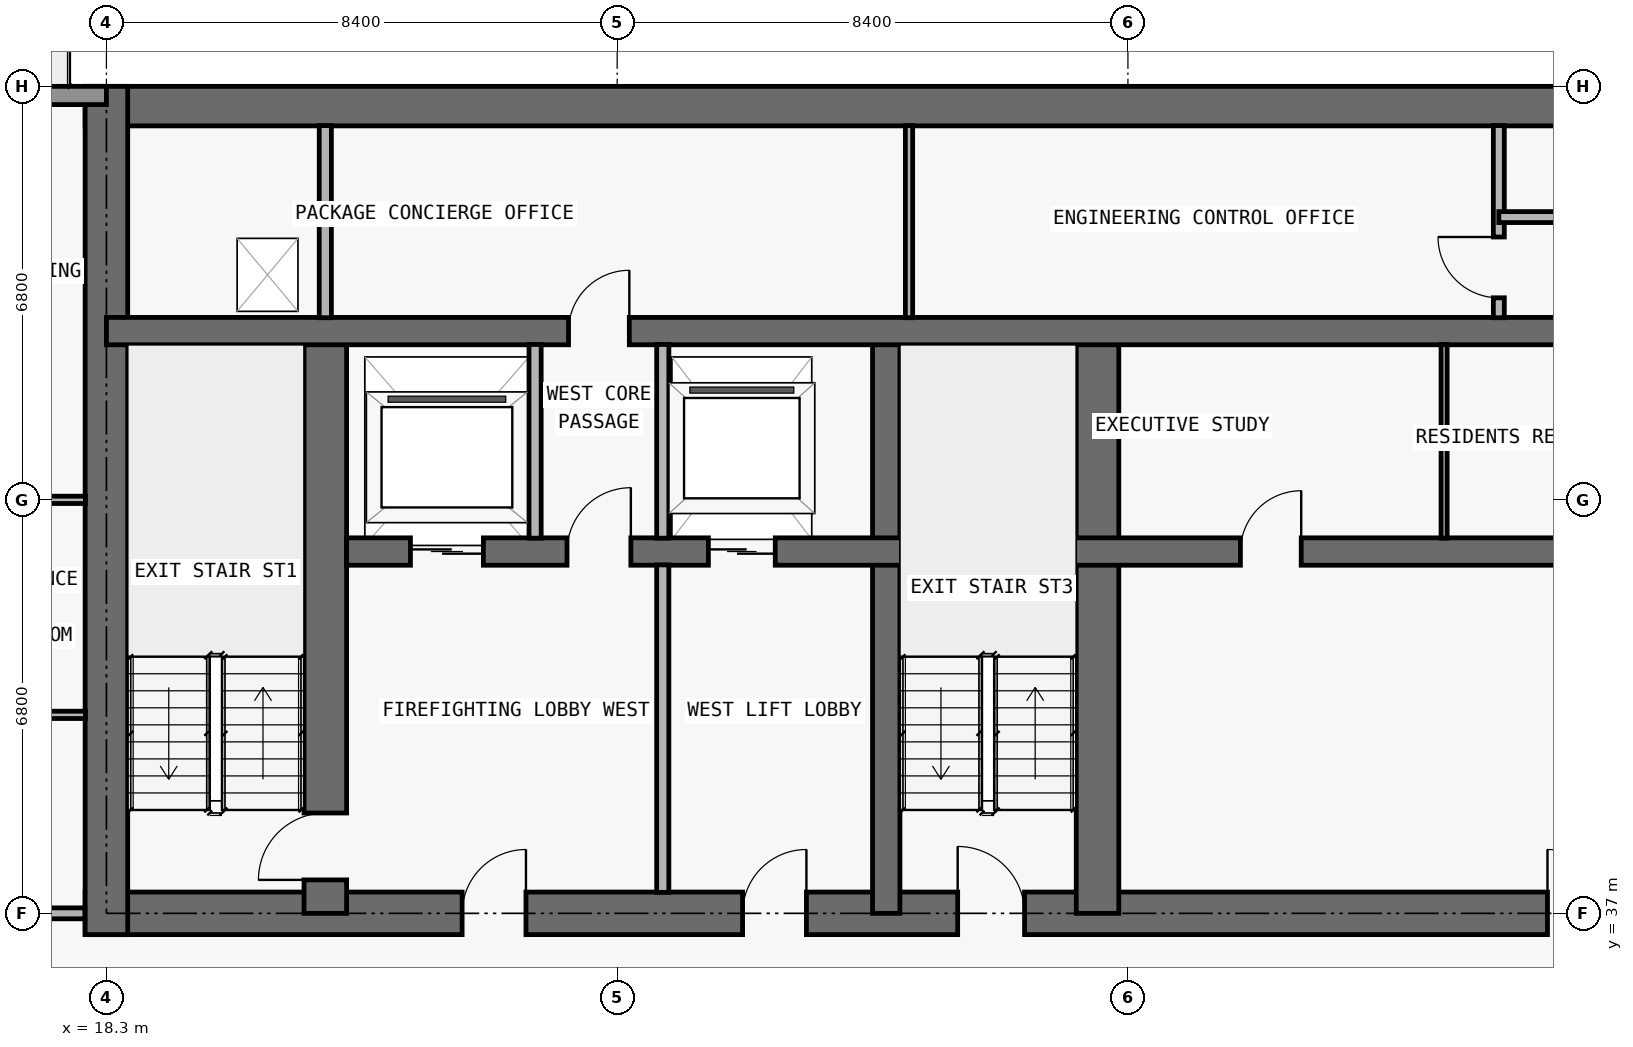
"""IFC4 building model, lengths in metres.
Left out: names, types, materials, properties, quantities, classifications, styles, units other than length and angle.
Written with IfcOpenShell. Run it as: python <this file> out.ifc"""

import sys

from ifc_helpers import new_model, si_unit, direction, frame, frame_2d, origin, place, context, subcontext, project, spatial, rectangle, extrude, element, fill, save


model = new_model("IFC4")
c1 = context("Model", 3, precision=1e-05, world=origin(), true_north=direction((0.0, 1.0)))
c2 = subcontext(c1, "Body", "Model", "MODEL_VIEW")
j1 = project(units=[si_unit("LENGTHUNIT", "METRE"), si_unit("PLANEANGLEUNIT", "RADIAN")], contexts=[c1])
p1 = place(None, origin())
s1 = spatial("IfcSite", under=j1, at=p1, CompositionType="ELEMENT")
p2 = place(p1, origin())
s2 = spatial("IfcBuilding", under=s1, at=p2, CompositionType="ELEMENT")
p3 = place(p2, frame((0.0, 0.0, 262.8)))
s3 = spatial("IfcBuildingStorey", under=s2, at=p3, CompositionType="ELEMENT", Elevation=262.8)
p4 = place(p3, frame((17.95, 37.0, 0.0), z_axis=(0.0, 0.0, 1.0), x_axis=(1.0, 0.0, 0.0)))
e1 = element("IfcWall", 1, at=p4, inside=s3, PredefinedType="SHEAR", context=c2, shape_type="SweptSolid", body=[
    extrude(rectangle(XDim=41.9, YDim=0.7, at=frame_2d((20.95, 0.0))), origin(), (0.0, 0.0, 1.0), 3.05),
])
p5 = place(p4, frame((14.35, 0.0, 0.0)))
e2 = element("IfcOpeningElement", 2, at=p5, cuts=e1, PredefinedType="OPENING", context=c2, shape_type="SweptSolid", body=[
    extrude(rectangle(XDim=1.1, YDim=2.15, at=frame_2d((0.55, 1.075))), frame((0.0, 0.36, 0.0), z_axis=(0.0, -1.0, 0.0), x_axis=(1.0, 0.0, 0.0)), (0.0, 0.0, 1.0), 0.72),
])
p6 = place(p4, frame((6.2, 0.0, 0.0)))
e3 = element("IfcOpeningElement", 3, at=p6, cuts=e1, PredefinedType="OPENING", context=c2, shape_type="SweptSolid", body=[
    extrude(rectangle(XDim=1.05, YDim=2.15, at=frame_2d((0.525, 1.075))), frame((0.0, 0.36, 0.0), z_axis=(0.0, -1.0, 0.0), x_axis=(1.0, 0.0, 0.0)), (0.0, 0.0, 1.0), 0.72),
])
p7 = place(p4, frame((34.7, 0.0, 0.0)))
e4 = element("IfcOpeningElement", 4, at=p7, cuts=e1, PredefinedType="OPENING", context=c2, shape_type="SweptSolid", body=[
    extrude(rectangle(XDim=1.05, YDim=2.15, at=frame_2d((0.525, 1.075))), frame((0.0, 0.36, 0.0), z_axis=(0.0, -1.0, 0.0), x_axis=(1.0, 0.0, 0.0)), (0.0, 0.0, 1.0), 0.72),
])
p8 = place(p4, frame((10.812, 0.0, 0.0)))
e5 = element("IfcOpeningElement", 5, at=p8, cuts=e1, PredefinedType="OPENING", context=c2, shape_type="SweptSolid", body=[
    extrude(rectangle(XDim=1.05, YDim=2.15, at=frame_2d((0.525, 1.075))), frame((0.0, 0.36, 0.0), z_axis=(0.0, -1.0, 0.0), x_axis=(1.0, 0.0, 0.0)), (0.0, 0.0, 1.0), 0.72),
])
p9 = place(p4, frame((24.05, 0.0, 0.0)))
e6 = element("IfcOpeningElement", 6, at=p9, cuts=e1, PredefinedType="OPENING", context=c2, shape_type="SweptSolid", body=[
    extrude(rectangle(XDim=1.05, YDim=2.15, at=frame_2d((0.525, 1.075))), frame((0.0, 0.36, 0.0), z_axis=(0.0, -1.0, 0.0), x_axis=(1.0, 0.0, 0.0)), (0.0, 0.0, 1.0), 0.72),
])
p10 = place(p3, frame((17.95, 50.275, 0.0), z_axis=(0.0, 0.0, 1.0), x_axis=(1.0, 0.0, 0.0)))
e7 = element("IfcWall", 7, at=p10, inside=s3, PredefinedType="SHEAR", context=c2, shape_type="SweptSolid", body=[
    extrude(rectangle(XDim=41.9, YDim=0.65, at=frame_2d((20.95, 0.0))), origin(), (0.0, 0.0, 1.0), 3.05),
])
p11 = place(p3, frame((18.3, 36.65, 0.0), z_axis=(0.0, 0.0, 1.0), x_axis=(0.0, 1.0, 0.0)))
e8 = element("IfcWall", 8, at=p11, inside=s3, PredefinedType="SHEAR", context=c2, shape_type="SweptSolid", body=[
    extrude(rectangle(XDim=13.95, YDim=0.7, at=frame_2d((6.975, 0.0))), origin(), (0.0, 0.0, 1.0), 3.05),
])
p12 = place(p3, frame((21.9, 37.0, 0.0), z_axis=(0.0, 0.0, 1.0), x_axis=(0.0, 1.0, 0.0)))
e9 = element("IfcWall", 9, at=p12, inside=s3, PredefinedType="SHEAR", context=c2, shape_type="SweptSolid", body=[
    extrude(rectangle(XDim=9.575, YDim=0.7, at=frame_2d((4.788, 0.0))), origin(), (0.0, 0.0, 1.0), 3.05),
])
p13 = place(p12, frame((0.55, 0.0, 0.0)))
e10 = element("IfcOpeningElement", 10, at=p13, cuts=e9, PredefinedType="OPENING", context=c2, shape_type="SweptSolid", body=[
    extrude(rectangle(XDim=1.1, YDim=2.15, at=frame_2d((0.55, 1.075))), frame((0.0, 0.36, 0.0), z_axis=(0.0, -1.0, 0.0), x_axis=(1.0, 0.0, 0.0)), (0.0, 0.0, 1.0), 0.72),
])
p14 = place(p3, frame((31.125, 37.0, 0.0), z_axis=(0.0, 0.0, 1.0), x_axis=(0.0, 1.0, 0.0)))
e11 = element("IfcWall", 11, at=p14, inside=s3, PredefinedType="SHEAR", context=c2, shape_type="SweptSolid", body=[
    extrude(rectangle(XDim=9.575, YDim=0.45, at=frame_2d((4.788, 0.0))), origin(), (0.0, 0.0, 1.0), 3.05),
])
p15 = place(p3, frame((34.6, 37.0, 0.0), z_axis=(0.0, 0.0, 1.0), x_axis=(0.0, 1.0, 0.0)))
e12 = element("IfcWall", 12, at=p15, inside=s3, PredefinedType="SHEAR", context=c2, shape_type="SweptSolid", body=[
    extrude(rectangle(XDim=9.575, YDim=0.7, at=frame_2d((4.788, 0.0))), origin(), (0.0, 0.0, 1.0), 3.05),
])
p16 = place(p3, frame((22.25, 42.95, 0.0), z_axis=(0.0, 0.0, 1.0), x_axis=(1.0, 0.0, 0.0)))
e13 = element("IfcWall", 13, at=p16, inside=s3, PredefinedType="SHEAR", context=c2, shape_type="SweptSolid", body=[
    extrude(rectangle(XDim=33.3, YDim=0.45, at=frame_2d((16.65, 0.0))), origin(), (0.0, 0.0, 1.0), 3.05),
])
p17 = place(p16, frame((1.05, 0.0, 0.0)))
e14 = element("IfcOpeningElement", 14, at=p17, cuts=e13, PredefinedType="OPENING", context=c2, shape_type="SweptSolid", body=[
    extrude(rectangle(XDim=1.2, YDim=2.2, at=frame_2d((0.6, 1.1))), frame((0.0, 0.235, 0.0), z_axis=(0.0, -1.0, 0.0), x_axis=(1.0, 0.0, 0.0)), (0.0, 0.0, 1.0), 0.47),
])
p18 = place(p16, frame((31.05, 0.0, 0.0)))
e15 = element("IfcOpeningElement", 15, at=p18, cuts=e13, PredefinedType="OPENING", context=c2, shape_type="SweptSolid", body=[
    extrude(rectangle(XDim=1.2, YDim=2.2, at=frame_2d((0.6, 1.1))), frame((0.0, 0.235, 0.0), z_axis=(0.0, -1.0, 0.0), x_axis=(1.0, 0.0, 0.0)), (0.0, 0.0, 1.0), 0.47),
])
p19 = place(p16, frame((26.45, 0.0, 0.0)))
e16 = element("IfcOpeningElement", 16, at=p19, cuts=e13, PredefinedType="OPENING", context=c2, shape_type="SweptSolid", body=[
    extrude(rectangle(XDim=1.1, YDim=2.2, at=frame_2d((0.55, 1.1))), frame((0.0, 0.235, 0.0), z_axis=(0.0, -1.0, 0.0), x_axis=(1.0, 0.0, 0.0)), (0.0, 0.0, 1.0), 0.47),
])
p20 = place(p16, frame((5.95, 0.0, 0.0)))
e17 = element("IfcOpeningElement", 17, at=p20, cuts=e13, PredefinedType="OPENING", context=c2, shape_type="SweptSolid", body=[
    extrude(rectangle(XDim=1.1, YDim=2.2, at=frame_2d((0.55, 1.1))), frame((0.0, 0.235, 0.0), z_axis=(0.0, -1.0, 0.0), x_axis=(1.0, 0.0, 0.0)), (0.0, 0.0, 1.0), 0.47),
])
p21 = place(p16, frame((3.625, 0.0, 0.0)))
e18 = element("IfcOpeningElement", 18, at=p21, cuts=e13, PredefinedType="OPENING", context=c2, shape_type="SweptSolid", body=[
    extrude(rectangle(XDim=1.05, YDim=2.15, at=frame_2d((0.525, 1.075))), frame((0.0, 0.235, 0.0), z_axis=(0.0, -1.0, 0.0), x_axis=(1.0, 0.0, 0.0)), (0.0, 0.0, 1.0), 0.47),
])
p22 = place(p16, frame((28.675, 0.0, 0.0)))
e19 = element("IfcOpeningElement", 19, at=p22, cuts=e13, PredefinedType="OPENING", context=c2, shape_type="SweptSolid", body=[
    extrude(rectangle(XDim=1.05, YDim=2.15, at=frame_2d((0.525, 1.075))), frame((0.0, 0.235, 0.0), z_axis=(0.0, -1.0, 0.0), x_axis=(1.0, 0.0, 0.0)), (0.0, 0.0, 1.0), 0.47),
])
p23 = place(p16, frame((14.7, 0.0, 0.0)))
e20 = element("IfcOpeningElement", 20, at=p23, cuts=e13, PredefinedType="OPENING", context=c2, shape_type="SweptSolid", body=[
    extrude(rectangle(XDim=1.0, YDim=2.2, at=frame_2d((0.5, 1.1))), frame((0.0, 0.235, 0.0), z_axis=(0.0, -1.0, 0.0), x_axis=(1.0, 0.0, 0.0)), (0.0, 0.0, 1.0), 0.47),
])
p24 = place(p16, frame((21.45, 0.0, 0.0)))
e21 = element("IfcOpeningElement", 21, at=p24, cuts=e13, PredefinedType="OPENING", context=c2, shape_type="SweptSolid", body=[
    extrude(rectangle(XDim=1.0, YDim=2.2, at=frame_2d((0.5, 1.1))), frame((0.0, 0.235, 0.0), z_axis=(0.0, -1.0, 0.0), x_axis=(1.0, 0.0, 0.0)), (0.0, 0.0, 1.0), 0.47),
])
p25 = place(p3, frame((18.3, 46.575, 0.0), z_axis=(0.0, 0.0, 1.0), x_axis=(1.0, 0.0, 0.0)))
e22 = element("IfcWall", 22, at=p25, inside=s3, PredefinedType="SHEAR", context=c2, shape_type="SweptSolid", body=[
    extrude(rectangle(XDim=41.2, YDim=0.45, at=frame_2d((20.6, 0.0))), origin(), (0.0, 0.0, 1.0), 3.05),
])
p26 = place(p25, frame((7.6, 0.0, 0.0)))
e23 = element("IfcOpeningElement", 23, at=p26, cuts=e22, PredefinedType="OPENING", context=c2, shape_type="SweptSolid", body=[
    extrude(rectangle(XDim=1.0, YDim=2.2, at=frame_2d((0.5, 1.1))), frame((0.0, 0.235, 0.0), z_axis=(0.0, -1.0, 0.0), x_axis=(1.0, 0.0, 0.0)), (0.0, 0.0, 1.0), 0.47),
])
p27 = place(p25, frame((32.625, 0.0, 0.0)))
e24 = element("IfcOpeningElement", 24, at=p27, cuts=e22, PredefinedType="OPENING", context=c2, shape_type="SweptSolid", body=[
    extrude(rectangle(XDim=1.05, YDim=2.15, at=frame_2d((0.525, 1.075))), frame((0.0, 0.235, 0.0), z_axis=(0.0, -1.0, 0.0), x_axis=(1.0, 0.0, 0.0)), (0.0, 0.0, 1.0), 0.47),
])
p28 = place(p3, frame((12.1, 50.45, 0.0), z_axis=(0.0, 0.0, 1.0), x_axis=(1.0, 0.0, 0.0)))
e25 = element("IfcWall", 25, at=p28, inside=s3, PredefinedType="STANDARD", context=c2, shape_type="SweptSolid", body=[
    extrude(rectangle(XDim=6.2, YDim=0.3, at=frame_2d((3.1, 0.0))), origin(), (0.0, 0.0, 1.0), 3.05),
])
p29 = place(p28, frame((2.1, 0.0, 0.0)))
e26 = element("IfcOpeningElement", 26, at=p29, cuts=e25, PredefinedType="OPENING", context=c2, shape_type="SweptSolid", body=[
    extrude(rectangle(XDim=2.0, YDim=2.3, at=frame_2d((1.0, 1.15))), frame((0.0, 0.16, 0.0), z_axis=(0.0, -1.0, 0.0), x_axis=(1.0, 0.0, 0.0)), (0.0, 0.0, 1.0), 0.32),
])
p30 = place(p3, frame((21.9, 46.795, 0.0), z_axis=(0.0, 0.0, 1.0), x_axis=(0.0, 1.0, 0.0)))
e27 = element("IfcWall", 27, at=p30, inside=s3, PredefinedType="PARTITIONING", context=c2, shape_type="SweptSolid", body=[
    extrude(rectangle(XDim=3.16, YDim=0.2, at=frame_2d((1.58, 0.0))), origin(), (0.0, 0.0, 1.0), 3.05),
])
p31 = place(p3, frame((25.35, 43.17, 0.0), z_axis=(0.0, 0.0, 1.0), x_axis=(0.0, 1.0, 0.0)))
e28 = element("IfcWall", 28, at=p31, inside=s3, PredefinedType="PARTITIONING", context=c2, shape_type="SweptSolid", body=[
    extrude(rectangle(XDim=3.185, YDim=0.2, at=frame_2d((1.593, 0.0))), origin(), (0.0, 0.0, 1.0), 3.05),
])
p32 = place(p3, frame((27.45, 37.345, 0.0), z_axis=(0.0, 0.0, 1.0), x_axis=(0.0, 1.0, 0.0)))
e29 = element("IfcWall", 29, at=p32, inside=s3, PredefinedType="PARTITIONING", context=c2, shape_type="SweptSolid", body=[
    extrude(rectangle(XDim=5.385, YDim=0.2, at=frame_2d((2.692, 0.0))), origin(), (0.0, 0.0, 1.0), 3.05),
])
p33 = place(p3, frame((27.45, 43.17, 0.0), z_axis=(0.0, 0.0, 1.0), x_axis=(0.0, 1.0, 0.0)))
e30 = element("IfcWall", 30, at=p33, inside=s3, PredefinedType="PARTITIONING", context=c2, shape_type="SweptSolid", body=[
    extrude(rectangle(XDim=3.185, YDim=0.2, at=frame_2d((1.593, 0.0))), origin(), (0.0, 0.0, 1.0), 3.05),
])
p34 = place(p3, frame((31.5, 46.795, 0.0), z_axis=(0.0, 0.0, 1.0), x_axis=(0.0, 1.0, 0.0)))
e31 = element("IfcWall", 31, at=p34, inside=s3, PredefinedType="PARTITIONING", context=c2, shape_type="SweptSolid", body=[
    extrude(rectangle(XDim=3.16, YDim=0.12, at=frame_2d((1.58, 0.0))), origin(), (0.0, 0.0, 1.0), 3.05),
])
p35 = place(p3, frame((40.3, 43.17, 0.0), z_axis=(0.0, 0.0, 1.0), x_axis=(0.0, 1.0, 0.0)))
e32 = element("IfcWall", 32, at=p35, inside=s3, PredefinedType="MOVABLE", context=c2, shape_type="SweptSolid", body=[
    extrude(rectangle(XDim=3.185, YDim=0.1, at=frame_2d((1.593, 0.0))), origin(), (0.0, 0.0, 1.0), 3.05),
])
p36 = place(p3, frame((41.2, 46.795, 0.0), z_axis=(0.0, 0.0, 1.0), x_axis=(0.0, 1.0, 0.0)))
e33 = element("IfcWall", 33, at=p36, inside=s3, PredefinedType="PARTITIONING", context=c2, shape_type="SweptSolid", body=[
    extrude(rectangle(XDim=3.16, YDim=0.18, at=frame_2d((1.58, 0.0))), origin(), (0.0, 0.0, 1.0), 3.05),
])
p37 = place(p36, frame((0.327, 0.0, 0.0)))
e34 = element("IfcOpeningElement", 34, at=p37, cuts=e33, PredefinedType="OPENING", context=c2, shape_type="SweptSolid", body=[
    extrude(rectangle(XDim=1.0, YDim=2.2, at=frame_2d((0.5, 1.1))), frame((0.0, 0.1, 0.0), z_axis=(0.0, -1.0, 0.0), x_axis=(1.0, 0.0, 0.0)), (0.0, 0.0, 1.0), 0.2),
])
p38 = place(p3, frame((15.203, 37.0, 0.0), z_axis=(0.0, 0.0, 1.0), x_axis=(1.0, 0.0, 0.0)))
e35 = element("IfcWall", 35, at=p38, inside=s3, PredefinedType="PARTITIONING", context=c2, shape_type="SweptSolid", body=[
    extrude(rectangle(XDim=2.742, YDim=0.18, at=frame_2d((1.371, 0.0))), origin(), (0.0, 0.0, 1.0), 3.05),
])
p39 = place(p3, frame((15.65, 40.264, 0.0), z_axis=(0.0, 0.0, 1.0), x_axis=(1.0, 0.0, 0.0)))
e36 = element("IfcWall", 36, at=p39, inside=s3, PredefinedType="PARTITIONING", context=c2, shape_type="SweptSolid", body=[
    extrude(rectangle(XDim=2.305, YDim=0.12, at=frame_2d((1.153, 0.0))), origin(), (0.0, 0.0, 1.0), 3.05),
])
p40 = place(p3, frame((15.203, 43.8, 0.0), z_axis=(0.0, 0.0, 1.0), x_axis=(1.0, 0.0, 0.0)))
e37 = element("IfcWall", 37, at=p40, inside=s3, PredefinedType="PARTITIONING", context=c2, shape_type="SweptSolid", body=[
    extrude(rectangle(XDim=2.752, YDim=0.12, at=frame_2d((1.376, 0.0))), origin(), (0.0, 0.0, 1.0), 2.418),
])
p41 = place(p40, frame((1.175, 0.0, 0.0)))
e38 = element("IfcOpeningElement", 38, at=p41, cuts=e37, PredefinedType="OPENING", context=c2, shape_type="SweptSolid", body=[
    extrude(rectangle(XDim=0.85, YDim=2.1, at=frame_2d((0.425, 1.05))), frame((0.0, 0.07, 0.0), z_axis=(0.0, -1.0, 0.0), x_axis=(1.0, 0.0, 0.0)), (0.0, 0.0, 1.0), 0.14),
])
p42 = place(p3, frame((41.2, 48.45, 0.0), z_axis=(0.0, 0.0, 1.0), x_axis=(1.0, 0.0, 0.0)))
e39 = element("IfcWall", 39, at=p42, inside=s3, PredefinedType="PARTITIONING", context=c2, shape_type="SweptSolid", body=[
    extrude(rectangle(XDim=14.7, YDim=0.18, at=frame_2d((7.35, 0.0))), origin(), (0.0, 0.0, 1.0), 3.05),
])
p43 = place(p42, frame((1.85, 0.0, 0.0)))
e40 = element("IfcOpeningElement", 40, at=p43, cuts=e39, PredefinedType="OPENING", context=c2, shape_type="SweptSolid", body=[
    extrude(rectangle(XDim=1.2, YDim=2.2, at=frame_2d((0.6, 1.1))), frame((0.0, 0.1, 0.0), z_axis=(0.0, -1.0, 0.0), x_axis=(1.0, 0.0, 0.0)), (0.0, 0.0, 1.0), 0.2),
])
p44 = place(p42, frame((6.75, 0.0, 0.0)))
e41 = element("IfcOpeningElement", 41, at=p44, cuts=e39, PredefinedType="OPENING", context=c2, shape_type="SweptSolid", body=[
    extrude(rectangle(XDim=1.2, YDim=2.2, at=frame_2d((0.6, 1.1))), frame((0.0, 0.1, 0.0), z_axis=(0.0, -1.0, 0.0), x_axis=(1.0, 0.0, 0.0)), (0.0, 0.0, 1.0), 0.2),
])
p45 = place(p42, frame((11.825, 0.0, 0.0)))
e42 = element("IfcOpeningElement", 42, at=p45, cuts=e39, PredefinedType="OPENING", context=c2, shape_type="SweptSolid", body=[
    extrude(rectangle(XDim=0.85, YDim=2.1, at=frame_2d((0.425, 1.05))), frame((0.0, 0.1, 0.0), z_axis=(0.0, -1.0, 0.0), x_axis=(1.0, 0.0, 0.0)), (0.0, 0.0, 1.0), 0.2),
])
p46 = place(p17, origin())
e43 = element("IfcDoor", 43, at=p46, inside=s3, OperationType="DOUBLE_DOOR_SLIDING", PredefinedType="DOOR", context=c2, shape_type="SweptSolid", body=[
    extrude(rectangle(XDim=1.2, YDim=2.2, at=frame_2d((0.6, 1.1))), frame((0.0, 0.025, 0.0), z_axis=(0.0, -1.0, 0.0), x_axis=(1.0, 0.0, 0.0)), (0.0, 0.0, 1.0), 0.05),
])
fill(e14, e43)
p47 = place(p20, origin())
e44 = element("IfcDoor", 44, at=p47, inside=s3, OperationType="DOUBLE_DOOR_SLIDING", PredefinedType="DOOR", context=c2, shape_type="SweptSolid", body=[
    extrude(rectangle(XDim=1.1, YDim=2.2, at=frame_2d((0.55, 1.1))), frame((0.0, 0.025, 0.0), z_axis=(0.0, -1.0, 0.0), x_axis=(1.0, 0.0, 0.0)), (0.0, 0.0, 1.0), 0.05),
])
fill(e17, e44)
p48 = place(p5, origin())
e45 = element("IfcDoor", 45, at=p48, inside=s3, OperationType="SINGLE_SWING_LEFT", PredefinedType="DOOR", context=c2, shape_type="SweptSolid", body=[
    extrude(rectangle(XDim=1.1, YDim=2.15, at=frame_2d((0.55, 1.075))), frame((0.0, 0.025, 0.0), z_axis=(0.0, -1.0, 0.0), x_axis=(1.0, 0.0, 0.0)), (0.0, 0.0, 1.0), 0.05),
])
fill(e2, e45)
p49 = place(p6, origin())
e46 = element("IfcDoor", 46, at=p49, inside=s3, OperationType="SINGLE_SWING_RIGHT", PredefinedType="DOOR", context=c2, shape_type="SweptSolid", body=[
    extrude(rectangle(XDim=1.05, YDim=2.15, at=frame_2d((0.525, 1.075))), frame((0.0, 0.025, 0.0), z_axis=(0.0, -1.0, 0.0), x_axis=(1.0, 0.0, 0.0)), (0.0, 0.0, 1.0), 0.05),
])
fill(e3, e46)
p50 = place(p13, origin())
e47 = element("IfcDoor", 47, at=p50, inside=s3, OperationType="SINGLE_SWING_LEFT", PredefinedType="DOOR", context=c2, shape_type="SweptSolid", body=[
    extrude(rectangle(XDim=1.1, YDim=2.15, at=frame_2d((0.55, 1.075))), frame((0.0, 0.025, 0.0), z_axis=(0.0, -1.0, 0.0), x_axis=(1.0, 0.0, 0.0)), (0.0, 0.0, 1.0), 0.05),
])
fill(e10, e47)
p51 = place(p21, origin())
e48 = element("IfcDoor", 48, at=p51, inside=s3, OperationType="SINGLE_SWING_RIGHT", PredefinedType="DOOR", context=c2, shape_type="SweptSolid", body=[
    extrude(rectangle(XDim=1.05, YDim=2.15, at=frame_2d((0.525, 1.075))), frame((0.0, 0.025, 0.0), z_axis=(0.0, -1.0, 0.0), x_axis=(1.0, 0.0, 0.0)), (0.0, 0.0, 1.0), 0.05),
])
fill(e18, e48)
p52 = place(p8, origin())
e49 = element("IfcDoor", 49, at=p52, inside=s3, OperationType="SINGLE_SWING_RIGHT", PredefinedType="DOOR", context=c2, shape_type="SweptSolid", body=[
    extrude(rectangle(XDim=1.05, YDim=2.15, at=frame_2d((0.525, 1.075))), frame((0.0, 0.025, 0.0), z_axis=(0.0, -1.0, 0.0), x_axis=(1.0, 0.0, 0.0)), (0.0, 0.0, 1.0), 0.05),
])
fill(e5, e49)
p53 = place(p9, origin())
e50 = element("IfcDoor", 50, at=p53, inside=s3, OperationType="SINGLE_SWING_LEFT", PredefinedType="DOOR", context=c2, shape_type="SweptSolid", body=[
    extrude(rectangle(XDim=1.05, YDim=2.15, at=frame_2d((0.525, 1.075))), frame((0.0, 0.025, 0.0), z_axis=(0.0, -1.0, 0.0), x_axis=(1.0, 0.0, 0.0)), (0.0, 0.0, 1.0), 0.05),
])
fill(e6, e50)
p54 = place(p23, origin())
e51 = element("IfcDoor", 51, at=p54, inside=s3, OperationType="SINGLE_SWING_RIGHT", PredefinedType="DOOR", context=c2, shape_type="SweptSolid", body=[
    extrude(rectangle(XDim=1.0, YDim=2.2, at=frame_2d((0.5, 1.1))), frame((0.0, 0.025, 0.0), z_axis=(0.0, -1.0, 0.0), x_axis=(1.0, 0.0, 0.0)), (0.0, 0.0, 1.0), 0.05),
])
fill(e20, e51)
p55 = place(p26, origin())
e52 = element("IfcDoor", 52, at=p55, inside=s3, OperationType="SINGLE_SWING_RIGHT", PredefinedType="DOOR", context=c2, shape_type="SweptSolid", body=[
    extrude(rectangle(XDim=1.0, YDim=2.2, at=frame_2d((0.5, 1.1))), frame((0.0, 0.025, 0.0), z_axis=(0.0, -1.0, 0.0), x_axis=(1.0, 0.0, 0.0)), (0.0, 0.0, 1.0), 0.05),
])
fill(e23, e52)
p56 = place(p37, origin())
e53 = element("IfcDoor", 53, at=p56, inside=s3, OperationType="SINGLE_SWING_RIGHT", PredefinedType="DOOR", context=c2, shape_type="SweptSolid", body=[
    extrude(rectangle(XDim=1.0, YDim=2.2, at=frame_2d((0.5, 1.1))), frame((0.0, 0.025, 0.0), z_axis=(0.0, -1.0, 0.0), x_axis=(1.0, 0.0, 0.0)), (0.0, 0.0, 1.0), 0.05),
])
fill(e34, e53)
save(model, sys.argv[1])
